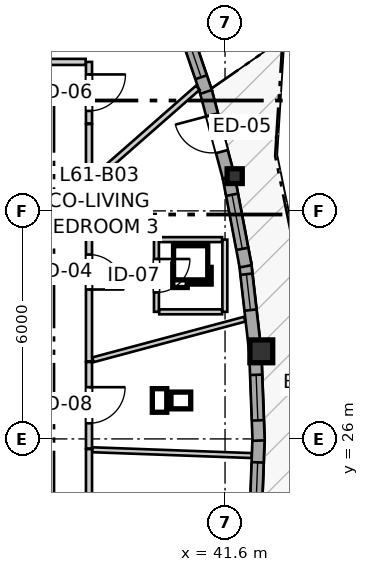
"""IFC4 building model, lengths in metres.
Left out: names, types, materials, properties, quantities, classifications, styles, units other than length and angle.
Written with IfcOpenShell. Run it as: python <this file> out.ifc"""

import sys

from ifc_helpers import new_model, si_unit, direction, frame, frame_2d, origin, origin_2d, place, context, subcontext, project, spatial, rectangle, i_section, extrude, source, transform, mapped, element, fill, save


model = new_model("IFC4")
c1 = context("Model", 3, precision=1e-05, world=origin(), true_north=direction((0.0, 1.0)))
c2 = subcontext(c1, "Body", "Model", "MODEL_VIEW")
j1 = project(units=[si_unit("LENGTHUNIT", "METRE"), si_unit("PLANEANGLEUNIT", "RADIAN")], contexts=[c1])
p1 = place(None, origin())
s1 = spatial("IfcSite", under=j1, at=p1, CompositionType="ELEMENT")
p2 = place(p1, origin())
s2 = spatial("IfcBuilding", under=s1, at=p2, CompositionType="ELEMENT")
p3 = place(p2, frame((0.0, 0.0, 205.2)))
s3 = spatial("IfcBuildingStorey", under=s2, at=p3, CompositionType="ELEMENT", Elevation=205.2)
m1 = source(origin(), c2, "Body", "SweptSolid", [
    extrude(rectangle(XDim=0.6, YDim=0.6, at=origin_2d()), origin(), (0.0, 0.0, 1.0), 2.935),
])
p4 = place(p3, frame((42.554, 28.304, 0.0), z_axis=(0.0, 0.0, 1.0), x_axis=(1.0, 0.0, 0.0)))
e1 = element("IfcColumn", 1, at=p4, inside=s3, PredefinedType="COLUMN", context=c2, shape_type="MappedRepresentation", body=[
    mapped(m1, transform((0.0, 0.0, 0.0), x_axis=(1.0, 0.0, 0.0), y_axis=(0.0, 1.0, 0.0), z_axis=(0.0, 0.0, 1.0), scale=1.0)),
])
m2 = source(origin(), c2, "Body", "SweptSolid", [
    extrude(i_section(OverallWidth=0.398, OverallDepth=0.387, WebThickness=0.019, FlangeThickness=0.03, FilletRadius=0.015, at=origin_2d()), origin(), (0.0, 0.0, 1.0), 2.935),
])
p5 = place(p3, frame((41.854, 32.914, 0.0), z_axis=(0.0, 0.0, 1.0), x_axis=(1.0, 0.0, 0.0)))
e2 = element("IfcColumn", 2, at=p5, inside=s3, PredefinedType="PILASTER", context=c2, shape_type="MappedRepresentation", body=[
    mapped(m2, transform((0.0, 0.0, 0.0), x_axis=(1.0, 0.0, 0.0), y_axis=(0.0, 1.0, 0.0), z_axis=(0.0, 0.0, 1.0), scale=1.0)),
])
p6 = place(p3, frame((42.395, 23.722, 0.0), z_axis=(0.0, 0.0, 1.0), x_axis=(0.038025668885, 0.999276762717, 0.0)))
e3 = element("IfcWall", 3, at=p6, inside=s3, PredefinedType="SOLIDWALL", context=c2, shape_type="SweptSolid", body=[
    extrude(rectangle(XDim=2.324, YDim=0.32, at=frame_2d((1.162, 0.0))), origin(), (0.0, 0.0, 1.0), 2.555),
])
p7 = place(p6, frame((0.312, 0.0, 0.82)))
e4 = element("IfcOpeningElement", 4, at=p7, cuts=e3, PredefinedType="OPENING", context=c2, shape_type="SweptSolid", body=[
    extrude(rectangle(XDim=1.35, YDim=1.45, at=frame_2d((0.675, 0.725))), frame((0.0, 0.17, 0.0), z_axis=(0.0, -1.0, 0.0), x_axis=(1.0, 0.0, 0.0)), (0.0, 0.0, 1.0), 0.34),
])
p8 = place(p3, frame((42.483, 25.956, 0.0), z_axis=(0.0, 0.0, 1.0), x_axis=(-0.038013039165, 0.999277243238, 0.0)))
e5 = element("IfcWall", 5, at=p8, inside=s3, PredefinedType="SOLIDWALL", context=c2, shape_type="SweptSolid", body=[
    extrude(rectangle(XDim=2.254, YDim=0.32, at=frame_2d((1.127, 0.0))), origin(), (0.0, 0.0, 1.0), 2.555),
])
p9 = place(p8, frame((0.532, 0.0, 0.82)))
e6 = element("IfcOpeningElement", 6, at=p9, cuts=e5, PredefinedType="OPENING", context=c2, shape_type="SweptSolid", body=[
    extrude(rectangle(XDim=1.2, YDim=1.45, at=frame_2d((0.6, 0.725))), frame((0.0, 0.17, 0.0), z_axis=(0.0, -1.0, 0.0), x_axis=(1.0, 0.0, 0.0)), (0.0, 0.0, 1.0), 0.34),
])
p10 = place(p3, frame((42.385, 28.376, 0.0), z_axis=(0.0, 0.0, 1.0), x_axis=(-0.113267221285, 0.993564560853, 0.0)))
e7 = element("IfcWall", 7, at=p10, inside=s3, PredefinedType="SOLIDWALL", context=c2, shape_type="SweptSolid", body=[
    extrude(rectangle(XDim=2.268, YDim=0.32, at=frame_2d((1.134, 0.0))), origin(), (0.0, 0.0, 1.0), 2.555),
])
p11 = place(p10, frame((1.021, 0.0, 0.82)))
e8 = element("IfcOpeningElement", 8, at=p11, cuts=e7, PredefinedType="OPENING", context=c2, shape_type="SweptSolid", body=[
    extrude(rectangle(XDim=0.95, YDim=1.35, at=frame_2d((0.475, 0.675))), frame((0.0, 0.17, 0.0), z_axis=(0.0, -1.0, 0.0), x_axis=(1.0, 0.0, 0.0)), (0.0, 0.0, 1.0), 0.34),
])
p12 = place(p3, frame((42.141, 30.542, 0.0), z_axis=(0.0, 0.0, 1.0), x_axis=(-0.186632734065, 0.982429754525, 0.0)))
e9 = element("IfcWall", 9, at=p12, inside=s3, PredefinedType="SOLIDWALL", context=c2, shape_type="SweptSolid", body=[
    extrude(rectangle(XDim=2.364, YDim=0.32, at=frame_2d((1.182, 0.0))), origin(), (0.0, 0.0, 1.0), 2.555),
])
p13 = place(p12, frame((0.467, 0.0, 0.82)))
e10 = element("IfcOpeningElement", 10, at=p13, cuts=e9, PredefinedType="OPENING", context=c2, shape_type="SweptSolid", body=[
    extrude(rectangle(XDim=1.45, YDim=1.25, at=frame_2d((0.725, 0.625))), frame((0.0, 0.17, 0.0), z_axis=(0.0, -1.0, 0.0), x_axis=(1.0, 0.0, 0.0)), (0.0, 0.0, 1.0), 0.34),
])
p14 = place(p3, frame((41.694, 32.892, 0.0), z_axis=(0.0, 0.0, 1.0), x_axis=(-0.257068132003, 0.966393282007, 0.0)))
e11 = element("IfcWall", 11, at=p14, inside=s3, PredefinedType="SOLIDWALL", context=c2, shape_type="SweptSolid", body=[
    extrude(rectangle(XDim=2.403, YDim=0.32, at=frame_2d((1.201, 0.0))), origin(), (0.0, 0.0, 1.0), 2.555),
])
p15 = place(p14, frame((0.691, 0.0, 0.0)))
e12 = element("IfcOpeningElement", 12, at=p15, cuts=e11, PredefinedType="OPENING", context=c2, shape_type="SweptSolid", body=[
    extrude(rectangle(XDim=1.0, YDim=2.1, at=frame_2d((0.5, 1.05))), frame((0.0, 0.17, 0.0), z_axis=(0.0, -1.0, 0.0), x_axis=(1.0, 0.0, 0.0)), (0.0, 0.0, 1.0), 0.34),
])
p16 = place(p3, frame((41.102, 35.13, 0.0), z_axis=(0.0, 0.0, 1.0), x_axis=(-0.323685265908, 0.946164810503, 0.0)))
e13 = element("IfcWall", 13, at=p16, inside=s3, PredefinedType="SOLIDWALL", context=c2, shape_type="SweptSolid", body=[
    extrude(rectangle(XDim=2.384, YDim=0.32, at=frame_2d((1.192, 0.0))), origin(), (0.0, 0.0, 1.0), 2.555),
])
p17 = place(p16, frame((0.408, 0.0, 0.82)))
e14 = element("IfcOpeningElement", 14, at=p17, cuts=e13, PredefinedType="OPENING", context=c2, shape_type="SweptSolid", body=[
    extrude(rectangle(XDim=1.6, YDim=1.35, at=frame_2d((0.8, 0.675))), frame((0.0, 0.17, 0.0), z_axis=(0.0, -1.0, 0.0), x_axis=(1.0, 0.0, 0.0)), (0.0, 0.0, 1.0), 0.34),
])
p18 = place(p3, frame((38.02, 32.748, 0.0), z_axis=(0.0, 0.0, 1.0), x_axis=(0.0, -1.0, 0.0)))
e15 = element("IfcWall", 15, at=p18, inside=s3, PredefinedType="PARTITIONING", context=c2, shape_type="SweptSolid", body=[
    extrude(rectangle(XDim=4.71, YDim=0.16, at=frame_2d((2.355, 0.0))), origin(), (0.0, 0.0, 1.0), 2.603),
])
p19 = place(p18, frame((1.897, 0.0, 0.0)))
e16 = element("IfcOpeningElement", 16, at=p19, cuts=e15, PredefinedType="OPENING", context=c2, shape_type="SweptSolid", body=[
    extrude(rectangle(XDim=0.92, YDim=2.1, at=frame_2d((0.46, 1.05))), frame((0.0, 0.09, 0.0), z_axis=(0.0, -1.0, 0.0), x_axis=(1.0, 0.0, 0.0)), (0.0, 0.0, 1.0), 0.18),
])
p20 = place(p3, frame((38.02, 25.733, 0.0), z_axis=(0.0, 0.0, 1.0), x_axis=(0.0, -1.0, 0.0)))
e17 = element("IfcWall", 17, at=p20, inside=s3, PredefinedType="PARTITIONING", context=c2, shape_type="SweptSolid", body=[
    extrude(rectangle(XDim=3.862, YDim=0.16, at=frame_2d((1.931, 0.0))), origin(), (0.0, 0.0, 1.0), 2.935),
])
p21 = place(p20, frame((1.47, 0.0, 0.0)))
e18 = element("IfcOpeningElement", 18, at=p21, cuts=e17, PredefinedType="OPENING", context=c2, shape_type="SweptSolid", body=[
    extrude(rectangle(XDim=0.92, YDim=2.1, at=frame_2d((0.46, 1.05))), frame((0.0, 0.09, 0.0), z_axis=(0.0, -1.0, 0.0), x_axis=(1.0, 0.0, 0.0)), (0.0, 0.0, 1.0), 0.18),
])
p22 = place(p3, frame((38.02, 28.023, 0.0), z_axis=(0.0, 0.0, 1.0), x_axis=(0.0, -1.0, 0.0)))
e19 = element("IfcWall", 19, at=p22, inside=s3, PredefinedType="PARTITIONING", context=c2, shape_type="SweptSolid", body=[
    extrude(rectangle(XDim=2.275, YDim=0.16, at=frame_2d((1.137, 0.0))), origin(), (0.0, 0.0, 1.0), 2.935),
])
p23 = place(p22, frame((0.662, 0.0, 0.0)))
e20 = element("IfcOpeningElement", 20, at=p23, cuts=e19, PredefinedType="OPENING", context=c2, shape_type="SweptSolid", body=[
    extrude(rectangle(XDim=0.95, YDim=2.1, at=frame_2d((0.475, 1.05))), frame((0.0, 0.09, 0.0), z_axis=(0.0, -1.0, 0.0), x_axis=(1.0, 0.0, 0.0)), (0.0, 0.0, 1.0), 0.18),
])
p24 = place(p3, frame((39.795, 31.244, 0.0), z_axis=(0.0, 0.0, 1.0), x_axis=(0.0, -1.0, 0.0)))
e21 = element("IfcWall", 21, at=p24, inside=s3, PredefinedType="PARTITIONING", context=c2, shape_type="SweptSolid", body=[
    extrude(rectangle(XDim=1.9, YDim=0.13, at=frame_2d((0.95, 0.0))), origin(), (0.0, 0.0, 1.0), 2.573),
])
p25 = place(p24, frame((0.51, 0.0, 0.0)))
e22 = element("IfcOpeningElement", 22, at=p25, cuts=e21, PredefinedType="OPENING", context=c2, shape_type="SweptSolid", body=[
    extrude(rectangle(XDim=0.88, YDim=2.05, at=frame_2d((0.44, 1.025))), frame((0.0, 0.075, 0.0), z_axis=(0.0, -1.0, 0.0), x_axis=(1.0, 0.0, 0.0)), (0.0, 0.0, 1.0), 0.15),
])
p26 = place(p3, frame((38.02, 35.92, 0.0), z_axis=(0.0, 0.0, 1.0), x_axis=(0.0, -1.0, 0.0)))
e23 = element("IfcWall", 23, at=p26, inside=s3, PredefinedType="PARTITIONING", context=c2, shape_type="SweptSolid", body=[
    extrude(rectangle(XDim=1.62, YDim=0.16, at=frame_2d((0.81, 0.0))), origin(), (0.0, 0.0, 1.0), 2.603),
])
p27 = place(p26, frame((0.33, 0.0, 0.0)))
e24 = element("IfcOpeningElement", 24, at=p27, cuts=e23, PredefinedType="OPENING", context=c2, shape_type="SweptSolid", body=[
    extrude(rectangle(XDim=0.96, YDim=2.1, at=frame_2d((0.48, 1.05))), frame((0.0, 0.09, 0.0), z_axis=(0.0, -1.0, 0.0), x_axis=(1.0, 0.0, 0.0)), (0.0, 0.0, 1.0), 0.18),
])
p28 = place(p3, frame((36.242, 36.044, 0.0), z_axis=(0.0, 0.0, 1.0), x_axis=(0.50599508157, 0.862536362959, 0.0)))
e25 = element("IfcWall", 25, at=p28, inside=s3, PredefinedType="PARTITIONING", context=c2, shape_type="SweptSolid", body=[
    extrude(rectangle(XDim=5.456, YDim=0.145, at=frame_2d((2.728, 0.0))), origin(), (0.0, 0.0, 1.0), 2.935),
])
p29 = place(p3, frame((38.11, 25.715, 0.0), z_axis=(0.0, 0.0, 1.0), x_axis=(0.99933433165, -0.036481414253, 0.0)))
e26 = element("IfcWall", 26, at=p29, inside=s3, PredefinedType="PARTITIONING", context=c2, shape_type="SweptSolid", body=[
    extrude(rectangle(XDim=4.189, YDim=0.13, at=frame_2d((2.095, 0.0))), origin(), (0.0, 0.0, 1.0), 2.935),
])
p30 = place(p3, frame((38.125, 28.082, 0.0), z_axis=(0.0, 0.0, 1.0), x_axis=(0.965997321458, 0.258552073934, 0.0)))
e27 = element("IfcWall", 27, at=p30, inside=s3, PredefinedType="PARTITIONING", context=c2, shape_type="SweptSolid", body=[
    extrude(rectangle(XDim=4.134, YDim=0.13, at=frame_2d((2.067, 0.0))), origin(), (0.0, 0.0, 1.0), 2.935),
])
p31 = place(p3, frame((38.154, 32.845, 0.0), z_axis=(0.0, 0.0, 1.0), x_axis=(0.751793032372, 0.659399148071, 0.0)))
e28 = element("IfcWall", 28, at=p31, inside=s3, PredefinedType="PARTITIONING", context=c2, shape_type="SweptSolid", body=[
    extrude(rectangle(XDim=3.631, YDim=0.145, at=frame_2d((1.815, 0.0))), origin(), (0.0, 0.0, 1.0), 2.935),
])
p32 = place(p3, frame((41.595, 29.344, 0.0), z_axis=(0.0, 0.0, 1.0), x_axis=(0.0, 1.0, 0.0)))
e29 = element("IfcWall", 29, at=p32, inside=s3, PredefinedType="PARTITIONING", context=c2, shape_type="SweptSolid", body=[
    extrude(rectangle(XDim=1.9, YDim=0.13, at=frame_2d((0.95, 0.0))), origin(), (0.0, 0.0, 1.0), 2.935),
])
for number, where, z_axis, x_axis in (
    (30, (39.868, 31.244, 0.0), (0.0, 0.0, 1.0), (1.0, 0.0, 0.0)),
    (31, (39.868, 29.344, 0.0), (0.0, 0.0, 1.0), (1.0, 0.0, 0.0)),
):
    element("IfcWall", number, at=place(p3, frame(where, z_axis=z_axis, x_axis=x_axis)), inside=s3, PredefinedType="PARTITIONING", context=c2, shape_type="SweptSolid", body=[
        extrude(rectangle(XDim=1.654, YDim=0.13, at=frame_2d((0.827, 0.0))), origin(), (0.0, 0.0, 1.0), 2.935),
    ])
p33 = place(p3, frame((36.4, 35.92, 0.0), z_axis=(0.0, 0.0, 1.0), x_axis=(1.0, 0.0, 0.0)))
e32 = element("IfcWall", 32, at=p33, inside=s3, PredefinedType="PARTITIONING", context=c2, shape_type="SweptSolid", body=[
    extrude(rectangle(XDim=1.532, YDim=0.16, at=frame_2d((0.766, 0.0))), origin(), (0.0, 0.0, 1.0), 2.935),
])
p34 = place(p3, frame((38.02, 32.938, 0.0), z_axis=(0.0, 0.0, 1.0), x_axis=(0.0, 1.0, 0.0)))
e33 = element("IfcWall", 33, at=p34, inside=s3, PredefinedType="PARTITIONING", context=c2, shape_type="SweptSolid", body=[
    extrude(rectangle(XDim=1.347, YDim=0.16, at=frame_2d((0.674, 0.0))), origin(), (0.0, 0.0, 1.0), 2.603),
])
m3 = source(origin(), c2, "Body", "SweptSolid", [
    extrude(rectangle(XDim=1.35, YDim=1.45, at=frame_2d((0.675, 0.725))), frame((0.0, 0.03, 0.0), z_axis=(0.0, -1.0, 0.0), x_axis=(1.0, 0.0, 0.0)), (0.0, 0.0, 1.0), 0.06),
])
p35 = place(p7, origin())
e34 = element("IfcWindow", 34, at=p35, inside=s3, PartitioningType="SINGLE_PANEL", PredefinedType="WINDOW", context=c2, shape_type="MappedRepresentation", body=[
    mapped(m3, transform((0.0, 0.0, 0.0), x_axis=(1.0, 0.0, 0.0), y_axis=(0.0, 1.0, 0.0), z_axis=(0.0, 0.0, 1.0), scale=1.0)),
])
fill(e4, e34)
m4 = source(origin(), c2, "Body", "SweptSolid", [
    extrude(rectangle(XDim=1.2, YDim=1.45, at=frame_2d((0.6, 0.725))), frame((0.0, 0.03, 0.0), z_axis=(0.0, -1.0, 0.0), x_axis=(1.0, 0.0, 0.0)), (0.0, 0.0, 1.0), 0.06),
])
p36 = place(p9, origin())
e35 = element("IfcWindow", 35, at=p36, inside=s3, PartitioningType="SINGLE_PANEL", PredefinedType="WINDOW", context=c2, shape_type="MappedRepresentation", body=[
    mapped(m4, transform((0.0, 0.0, 0.0), x_axis=(1.0, 0.0, 0.0), y_axis=(0.0, 1.0, 0.0), z_axis=(0.0, 0.0, 1.0), scale=1.0)),
])
fill(e6, e35)
m5 = source(origin(), c2, "Body", "SweptSolid", [
    extrude(rectangle(XDim=0.95, YDim=1.35, at=frame_2d((0.475, 0.675))), frame((0.0, 0.03, 0.0), z_axis=(0.0, -1.0, 0.0), x_axis=(1.0, 0.0, 0.0)), (0.0, 0.0, 1.0), 0.06),
])
p37 = place(p11, origin())
e36 = element("IfcWindow", 36, at=p37, inside=s3, PartitioningType="SINGLE_PANEL", PredefinedType="WINDOW", context=c2, shape_type="MappedRepresentation", body=[
    mapped(m5, transform((0.0, 0.0, 0.0), x_axis=(1.0, 0.0, 0.0), y_axis=(0.0, 1.0, 0.0), z_axis=(0.0, 0.0, 1.0), scale=1.0)),
])
fill(e8, e36)
m6 = source(origin(), c2, "Body", "SweptSolid", [
    extrude(rectangle(XDim=1.45, YDim=1.25, at=frame_2d((0.725, 0.625))), frame((0.0, 0.03, 0.0), z_axis=(0.0, -1.0, 0.0), x_axis=(1.0, 0.0, 0.0)), (0.0, 0.0, 1.0), 0.06),
])
p38 = place(p13, origin())
e37 = element("IfcWindow", 37, at=p38, inside=s3, PartitioningType="SINGLE_PANEL", PredefinedType="WINDOW", context=c2, shape_type="MappedRepresentation", body=[
    mapped(m6, transform((0.0, 0.0, 0.0), x_axis=(1.0, 0.0, 0.0), y_axis=(0.0, 1.0, 0.0), z_axis=(0.0, 0.0, 1.0), scale=1.0)),
])
fill(e10, e37)
m7 = source(origin(), c2, "Body", "SweptSolid", [
    extrude(rectangle(XDim=1.0, YDim=2.1, at=frame_2d((0.5, 1.05))), frame((0.0, 0.025, 0.0), z_axis=(0.0, -1.0, 0.0), x_axis=(1.0, 0.0, 0.0)), (0.0, 0.0, 1.0), 0.05),
])
p39 = place(p15, origin())
e38 = element("IfcDoor", 38, at=p39, inside=s3, OperationType="SINGLE_SWING_RIGHT", PredefinedType="DOOR", context=c2, shape_type="MappedRepresentation", body=[
    mapped(m7, transform((0.0, 0.0, 0.0), x_axis=(1.0, 0.0, 0.0), y_axis=(0.0, 1.0, 0.0), z_axis=(0.0, 0.0, 1.0), scale=1.0)),
])
fill(e12, e38)
m8 = source(origin(), c2, "Body", "SweptSolid", [
    extrude(rectangle(XDim=1.6, YDim=1.35, at=frame_2d((0.8, 0.675))), frame((0.0, 0.03, 0.0), z_axis=(0.0, -1.0, 0.0), x_axis=(1.0, 0.0, 0.0)), (0.0, 0.0, 1.0), 0.06),
])
p40 = place(p17, origin())
e39 = element("IfcWindow", 39, at=p40, inside=s3, PartitioningType="SINGLE_PANEL", PredefinedType="WINDOW", context=c2, shape_type="MappedRepresentation", body=[
    mapped(m8, transform((0.0, 0.0, 0.0), x_axis=(1.0, 0.0, 0.0), y_axis=(0.0, 1.0, 0.0), z_axis=(0.0, 0.0, 1.0), scale=1.0)),
])
fill(e14, e39)
m9 = source(origin(), c2, "Body", "SweptSolid", [
    extrude(rectangle(XDim=0.92, YDim=2.1, at=frame_2d((0.46, 1.05))), frame((0.0, 0.025, 0.0), z_axis=(0.0, -1.0, 0.0), x_axis=(1.0, 0.0, 0.0)), (0.0, 0.0, 1.0), 0.05),
])
p41 = place(p19, origin())
e40 = element("IfcDoor", 40, at=p41, inside=s3, OperationType="SINGLE_SWING_RIGHT", PredefinedType="DOOR", context=c2, shape_type="MappedRepresentation", body=[
    mapped(m9, transform((0.0, 0.0, 0.0), x_axis=(1.0, 0.0, 0.0), y_axis=(0.0, 1.0, 0.0), z_axis=(0.0, 0.0, 1.0), scale=1.0)),
])
fill(e16, e40)
m10 = source(origin(), c2, "Body", "SweptSolid", [
    extrude(rectangle(XDim=0.95, YDim=2.1, at=frame_2d((0.475, 1.05))), frame((0.0, 0.025, 0.0), z_axis=(0.0, -1.0, 0.0), x_axis=(1.0, 0.0, 0.0)), (0.0, 0.0, 1.0), 0.05),
])
p42 = place(p23, origin())
e41 = element("IfcDoor", 41, at=p42, inside=s3, OperationType="SINGLE_SWING_LEFT", PredefinedType="DOOR", context=c2, shape_type="MappedRepresentation", body=[
    mapped(m10, transform((0.0, 0.0, 0.0), x_axis=(1.0, 0.0, 0.0), y_axis=(0.0, 1.0, 0.0), z_axis=(0.0, 0.0, 1.0), scale=1.0)),
])
fill(e20, e41)
m11 = source(origin(), c2, "Body", "SweptSolid", [
    extrude(rectangle(XDim=0.88, YDim=2.05, at=frame_2d((0.44, 1.025))), frame((0.0, 0.025, 0.0), z_axis=(0.0, -1.0, 0.0), x_axis=(1.0, 0.0, 0.0)), (0.0, 0.0, 1.0), 0.05),
])
p43 = place(p25, origin())
e42 = element("IfcDoor", 42, at=p43, inside=s3, OperationType="SINGLE_SWING_LEFT", PredefinedType="DOOR", context=c2, shape_type="MappedRepresentation", body=[
    mapped(m11, transform((0.0, 0.0, 0.0), x_axis=(1.0, 0.0, 0.0), y_axis=(0.0, 1.0, 0.0), z_axis=(0.0, 0.0, 1.0), scale=1.0)),
])
fill(e22, e42)
m12 = source(origin(), c2, "Body", "SweptSolid", [
    extrude(rectangle(XDim=0.96, YDim=2.1, at=frame_2d((0.48, 1.05))), frame((0.0, 0.025, 0.0), z_axis=(0.0, -1.0, 0.0), x_axis=(1.0, 0.0, 0.0)), (0.0, 0.0, 1.0), 0.05),
])
p44 = place(p27, origin())
e43 = element("IfcDoor", 43, at=p44, inside=s3, OperationType="SINGLE_SWING_LEFT", PredefinedType="DOOR", context=c2, shape_type="MappedRepresentation", body=[
    mapped(m12, transform((0.0, 0.0, 0.0), x_axis=(1.0, 0.0, 0.0), y_axis=(0.0, 1.0, 0.0), z_axis=(0.0, 0.0, 1.0), scale=1.0)),
])
fill(e24, e43)
save(model, sys.argv[1])
